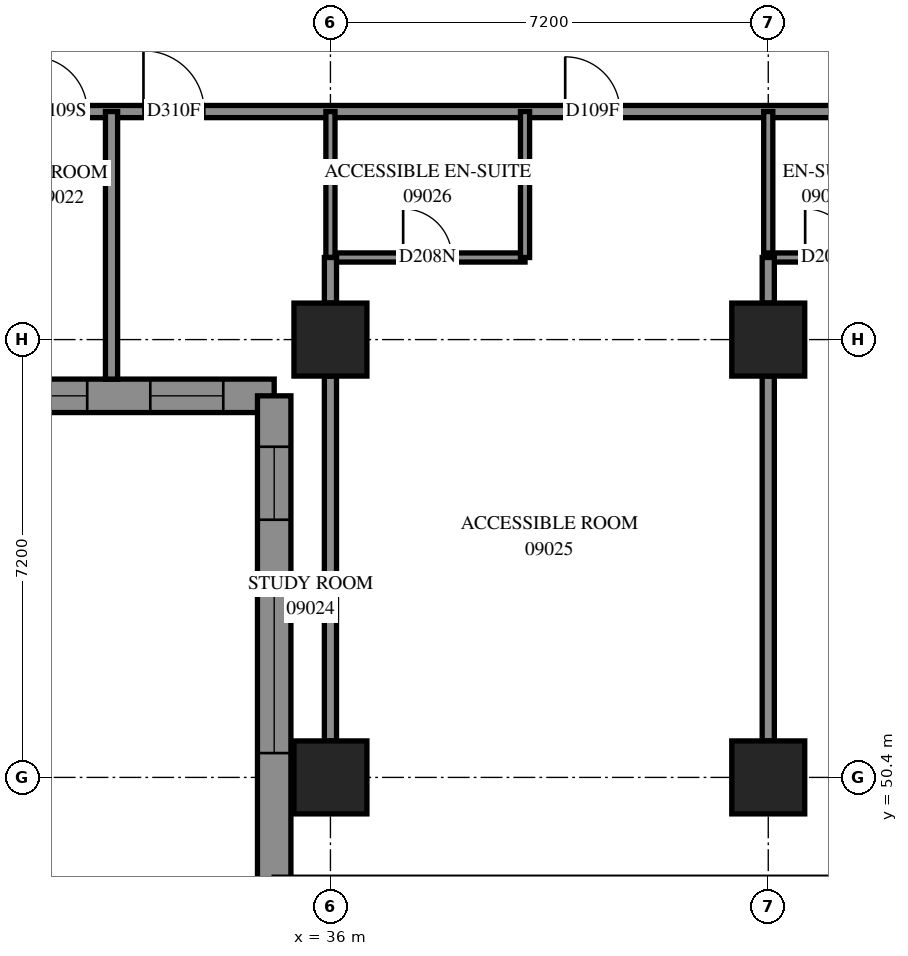
"""IFC4 building model, lengths in metres.
Left out: names, types, materials, properties, quantities, classifications, styles, units other than length and angle.
Written with IfcOpenShell. Run it as: python <this file> out.ifc"""

import sys

from ifc_helpers import new_model, si_unit, direction, frame, frame_2d, origin, origin_2d, place, context, subcontext, project, spatial, polyline, rectangle, outline, extrude, element, fill, save


model = new_model("IFC4")
c1 = context("Model", 3, precision=1e-05, world=origin(), true_north=direction((0.0, 1.0)))
c2 = subcontext(c1, "Body", "Model", "MODEL_VIEW")
j1 = project(units=[si_unit("LENGTHUNIT", "METRE"), si_unit("PLANEANGLEUNIT", "RADIAN")], contexts=[c1])
p1 = place(None, origin())
s1 = spatial("IfcSite", under=j1, at=p1, CompositionType="ELEMENT")
p2 = place(p1, origin())
s2 = spatial("IfcBuilding", under=s1, at=p2, CompositionType="ELEMENT")
p3 = place(p2, frame((0.0, 0.0, 37.2)))
s3 = spatial("IfcBuildingStorey", under=s2, at=p3, CompositionType="ELEMENT", Elevation=37.2)
for number, where, z_axis, x_axis in (
    (1, (36.0, 50.4, 0.0), (0.0, 0.0, 1.0), (1.0, 0.0, 0.0)),
    (2, (36.0, 57.6, 0.0), (0.0, 0.0, 1.0), (1.0, 0.0, 0.0)),
    (3, (43.2, 50.4, 0.0), (0.0, 0.0, 1.0), (1.0, 0.0, 0.0)),
    (4, (43.2, 57.6, 0.0), (0.0, 0.0, 1.0), (1.0, 0.0, 0.0)),
):
    element("IfcColumn", number, at=place(p3, frame(where, z_axis=z_axis, x_axis=x_axis)), inside=s3, PredefinedType="COLUMN", context=c2, shape_type="SweptSolid", body=[
        extrude(rectangle(XDim=1.2, YDim=1.2, at=origin_2d()), origin(), (0.0, 0.0, 1.0), 3.1),
    ])
p4 = place(p3, frame((27.875, 56.675, 0.0), z_axis=(0.0, 0.0, 1.0), x_axis=(1.0, 0.0, 0.0)))
e5 = element("IfcWall", 5, at=p4, inside=s3, PredefinedType="SOLIDWALL", context=c2, shape_type="SweptSolid", body=[
    extrude(outline(polyline([(-0.275, -0.275), (6.925, -0.275), (7.475, 0.275), (0.275, 0.275), (-0.275, -0.275)])), origin(), (0.0, 0.0, 1.0), 3.1),
])
p5 = place(p4, frame((1.325, 0.0, 0.5)))
e6 = element("IfcOpeningElement", 6, at=p5, cuts=e5, PredefinedType="OPENING", context=c2, shape_type="SweptSolid", body=[
    extrude(rectangle(XDim=2.8, YDim=2.45, at=frame_2d((1.4, 1.225))), frame((0.0, 0.285, 0.0), z_axis=(0.0, -1.0, 0.0), x_axis=(1.0, 0.0, 0.0)), (0.0, 0.0, 1.0), 0.57),
])
p6 = place(p4, frame((5.162, 0.0, 0.5)))
e7 = element("IfcOpeningElement", 7, at=p6, cuts=e5, PredefinedType="OPENING", context=c2, shape_type="SweptSolid", body=[
    extrude(rectangle(XDim=1.2, YDim=2.45, at=frame_2d((0.6, 1.225))), frame((0.0, 0.285, 0.0), z_axis=(0.0, -1.0, 0.0), x_axis=(1.0, 0.0, 0.0)), (0.0, 0.0, 1.0), 0.57),
])
p7 = place(p3, frame((35.075, 56.675, 0.0), z_axis=(0.0, 0.0, 1.0), x_axis=(0.0, -1.0, 0.0)))
e8 = element("IfcWall", 8, at=p7, inside=s3, PredefinedType="SOLIDWALL", context=c2, shape_type="SweptSolid", body=[
    extrude(outline(polyline([(0.275, -0.275), (8.466, -0.275), (7.916, 0.275), (-0.275, 0.275), (0.275, -0.275)])), origin(), (0.0, 0.0, 1.0), 3.1),
])
p8 = place(p7, frame((3.075, 0.0, 0.5)))
e9 = element("IfcOpeningElement", 9, at=p8, cuts=e8, PredefinedType="OPENING", context=c2, shape_type="SweptSolid", body=[
    extrude(rectangle(XDim=2.8, YDim=2.45, at=frame_2d((1.4, 1.225))), frame((0.0, 0.285, 0.0), z_axis=(0.0, -1.0, 0.0), x_axis=(1.0, 0.0, 0.0)), (0.0, 0.0, 1.0), 0.57),
])
p9 = place(p7, frame((0.838, 0.0, 0.5)))
e10 = element("IfcOpeningElement", 10, at=p9, cuts=e8, PredefinedType="OPENING", context=c2, shape_type="SweptSolid", body=[
    extrude(rectangle(XDim=1.2, YDim=2.45, at=frame_2d((0.6, 1.225))), frame((0.0, 0.285, 0.0), z_axis=(0.0, -1.0, 0.0), x_axis=(1.0, 0.0, 0.0)), (0.0, 0.0, 1.0), 0.57),
])
p10 = place(p3, frame((28.8, 61.35, 0.0), z_axis=(0.0, 0.0, 1.0), x_axis=(1.0, 0.0, 0.0)))
e11 = element("IfcWall", 11, at=p10, inside=s3, PredefinedType="PARTITIONING", context=c2, shape_type="SweptSolid", body=[
    extrude(rectangle(XDim=24.15, YDim=0.2, at=frame_2d((12.075, 0.0))), origin(), (0.0, 0.0, 1.0), 3.1),
])
p11 = place(p10, frame((2.3, 0.0, 0.0)))
e12 = element("IfcOpeningElement", 12, at=p11, cuts=e11, PredefinedType="OPENING", context=c2, shape_type="SweptSolid", body=[
    extrude(rectangle(XDim=0.9, YDim=2.1, at=frame_2d((0.45, 1.05))), frame((0.0, 0.11, 0.0), z_axis=(0.0, -1.0, 0.0), x_axis=(1.0, 0.0, 0.0)), (0.0, 0.0, 1.0), 0.22),
])
p12 = place(p10, frame((4.125, 0.0, 0.0)))
e13 = element("IfcOpeningElement", 13, at=p12, cuts=e11, PredefinedType="OPENING", context=c2, shape_type="SweptSolid", body=[
    extrude(rectangle(XDim=1.0, YDim=2.1, at=frame_2d((0.5, 1.05))), frame((0.0, 0.11, 0.0), z_axis=(0.0, -1.0, 0.0), x_axis=(1.0, 0.0, 0.0)), (0.0, 0.0, 1.0), 0.22),
])
p13 = place(p10, frame((11.061, 0.0, 0.0)))
e14 = element("IfcOpeningElement", 14, at=p13, cuts=e11, PredefinedType="OPENING", context=c2, shape_type="SweptSolid", body=[
    extrude(rectangle(XDim=0.9, YDim=2.1, at=frame_2d((0.45, 1.05))), frame((0.0, 0.11, 0.0), z_axis=(0.0, -1.0, 0.0), x_axis=(1.0, 0.0, 0.0)), (0.0, 0.0, 1.0), 0.22),
])
p14 = place(p10, frame((16.7, 0.0, 0.0)))
e15 = element("IfcOpeningElement", 15, at=p14, cuts=e11, PredefinedType="OPENING", context=c2, shape_type="SweptSolid", body=[
    extrude(rectangle(XDim=0.9, YDim=2.1, at=frame_2d((0.45, 1.05))), frame((0.0, 0.11, 0.0), z_axis=(0.0, -1.0, 0.0), x_axis=(1.0, 0.0, 0.0)), (0.0, 0.0, 1.0), 0.22),
])
p15 = place(p10, frame((18.508, 0.0, 0.0)))
e16 = element("IfcOpeningElement", 16, at=p15, cuts=e11, PredefinedType="OPENING", context=c2, shape_type="SweptSolid", body=[
    extrude(rectangle(XDim=1.0, YDim=2.1, at=frame_2d((0.5, 1.05))), frame((0.0, 0.11, 0.0), z_axis=(0.0, -1.0, 0.0), x_axis=(1.0, 0.0, 0.0)), (0.0, 0.0, 1.0), 0.22),
])
p16 = place(p10, frame((22.882, 0.0, 0.0)))
e17 = element("IfcOpeningElement", 17, at=p16, cuts=e11, PredefinedType="OPENING", context=c2, shape_type="SweptSolid", body=[
    extrude(rectangle(XDim=1.0, YDim=2.1, at=frame_2d((0.5, 1.05))), frame((0.0, 0.11, 0.0), z_axis=(0.0, -1.0, 0.0), x_axis=(1.0, 0.0, 0.0)), (0.0, 0.0, 1.0), 0.22),
])
p17 = place(p3, frame((36.0, 51.0, 0.0), z_axis=(0.0, 0.0, 1.0), x_axis=(0.0, 1.0, 0.0)))
e18 = element("IfcWall", 18, at=p17, inside=s3, PredefinedType="PARTITIONING", context=c2, shape_type="SweptSolid", body=[
    extrude(rectangle(XDim=6.0, YDim=0.2, at=frame_2d((3.0, 0.0))), origin(), (0.0, 0.0, 1.0), 2.6),
])
p18 = place(p3, frame((43.2, 51.0, 0.0), z_axis=(0.0, 0.0, 1.0), x_axis=(0.0, 1.0, 0.0)))
e19 = element("IfcWall", 19, at=p18, inside=s3, PredefinedType="PARTITIONING", context=c2, shape_type="SweptSolid", body=[
    extrude(rectangle(XDim=6.0, YDim=0.2, at=frame_2d((3.0, 0.0))), origin(), (0.0, 0.0, 1.0), 3.1),
])
p19 = place(p3, frame((32.4, 56.95, 0.0), z_axis=(0.0, 0.0, 1.0), x_axis=(0.0, 1.0, 0.0)))
e20 = element("IfcWall", 20, at=p19, inside=s3, PredefinedType="PARTITIONING", context=c2, shape_type="SweptSolid", body=[
    extrude(rectangle(XDim=4.4, YDim=0.2, at=frame_2d((2.2, 0.0))), origin(), (0.0, 0.0, 1.0), 3.1),
])
p20 = place(p3, frame((36.0, 58.95, 0.0), z_axis=(0.0, 0.0, 1.0), x_axis=(1.0, 0.0, 0.0)))
e21 = element("IfcWall", 21, at=p20, inside=s3, PredefinedType="PARTITIONING", context=c2, shape_type="SweptSolid", body=[
    extrude(rectangle(XDim=3.2, YDim=0.15, at=frame_2d((1.6, 0.0))), origin(), (0.0, 0.0, 1.0), 3.1),
])
p21 = place(p20, frame((1.196, 0.0, 0.0)))
e22 = element("IfcOpeningElement", 22, at=p21, cuts=e21, PredefinedType="OPENING", context=c2, shape_type="SweptSolid", body=[
    extrude(rectangle(XDim=0.8, YDim=2.1, at=frame_2d((0.4, 1.05))), frame((0.0, 0.085, 0.0), z_axis=(0.0, -1.0, 0.0), x_axis=(1.0, 0.0, 0.0)), (0.0, 0.0, 1.0), 0.17),
])
for number, where, z_axis, x_axis in (
    (23, (39.2, 58.95, 0.0), (0.0, 0.0, 1.0), (0.0, 1.0, 0.0)),
    (24, (36.0, 58.95, 0.0), (0.0, 0.0, 1.0), (0.0, 1.0, 0.0)),
    (25, (43.2, 58.95, 0.0), (0.0, 0.0, 1.0), (0.0, 1.0, 0.0)),
):
    element("IfcWall", number, at=place(p3, frame(where, z_axis=z_axis, x_axis=x_axis)), inside=s3, PredefinedType="PARTITIONING", context=c2, shape_type="SweptSolid", body=[
        extrude(rectangle(XDim=2.4, YDim=0.15, at=frame_2d((1.2, 0.0))), origin(), (0.0, 0.0, 1.0), 3.1),
    ])
p22 = place(p3, frame((43.2, 58.95, 0.0), z_axis=(0.0, 0.0, 1.0), x_axis=(1.0, 0.0, 0.0)))
e26 = element("IfcWall", 26, at=p22, inside=s3, PredefinedType="PARTITIONING", context=c2, shape_type="SweptSolid", body=[
    extrude(rectangle(XDim=1.9, YDim=0.15, at=frame_2d((0.95, 0.0))), origin(), (0.0, 0.0, 1.0), 3.1),
])
p23 = place(p22, frame((0.607, 0.0, 0.0)))
e27 = element("IfcOpeningElement", 27, at=p23, cuts=e26, PredefinedType="OPENING", context=c2, shape_type="SweptSolid", body=[
    extrude(rectangle(XDim=0.8, YDim=2.1, at=frame_2d((0.4, 1.05))), frame((0.0, 0.085, 0.0), z_axis=(0.0, -1.0, 0.0), x_axis=(1.0, 0.0, 0.0)), (0.0, 0.0, 1.0), 0.17),
])
for number, where, z_axis, x_axis in (
    (28, (36.0, 58.2, 0.0), (0.0, 0.0, 1.0), (0.0, 1.0, 0.0)),
    (29, (43.2, 58.2, 0.0), (0.0, 0.0, 1.0), (0.0, 1.0, 0.0)),
):
    element("IfcWall", number, at=place(p3, frame(where, z_axis=z_axis, x_axis=x_axis)), inside=s3, PredefinedType="PARTITIONING", context=c2, shape_type="SweptSolid", body=[
        extrude(rectangle(XDim=0.75, YDim=0.2, at=frame_2d((0.375, 0.0))), origin(), (0.0, 0.0, 1.0), 3.1),
    ])
p24 = place(p5, origin())
e30 = element("IfcWindow", 30, at=p24, inside=s3, PartitioningType="SINGLE_PANEL", PredefinedType="WINDOW", context=c2, shape_type="SweptSolid", body=[
    extrude(rectangle(XDim=2.8, YDim=2.45, at=frame_2d((1.4, 1.225))), frame((0.0, 0.155, 0.0), z_axis=(0.0, -1.0, 0.0), x_axis=(1.0, 0.0, 0.0)), (0.0, 0.0, 1.0), 0.06),
])
fill(e6, e30)
p25 = place(p6, origin())
e31 = element("IfcWindow", 31, at=p25, inside=s3, PartitioningType="SINGLE_PANEL", PredefinedType="WINDOW", context=c2, shape_type="SweptSolid", body=[
    extrude(rectangle(XDim=1.2, YDim=2.45, at=frame_2d((0.6, 1.225))), frame((0.0, 0.155, 0.0), z_axis=(0.0, -1.0, 0.0), x_axis=(1.0, 0.0, 0.0)), (0.0, 0.0, 1.0), 0.06),
])
fill(e7, e31)
p26 = place(p8, origin())
e32 = element("IfcWindow", 32, at=p26, inside=s3, PartitioningType="SINGLE_PANEL", PredefinedType="WINDOW", context=c2, shape_type="SweptSolid", body=[
    extrude(rectangle(XDim=2.8, YDim=2.45, at=frame_2d((1.4, 1.225))), frame((0.0, 0.155, 0.0), z_axis=(0.0, -1.0, 0.0), x_axis=(1.0, 0.0, 0.0)), (0.0, 0.0, 1.0), 0.06),
])
fill(e9, e32)
p27 = place(p9, origin())
e33 = element("IfcWindow", 33, at=p27, inside=s3, PartitioningType="SINGLE_PANEL", PredefinedType="WINDOW", context=c2, shape_type="SweptSolid", body=[
    extrude(rectangle(XDim=1.2, YDim=2.45, at=frame_2d((0.6, 1.225))), frame((0.0, 0.155, 0.0), z_axis=(0.0, -1.0, 0.0), x_axis=(1.0, 0.0, 0.0)), (0.0, 0.0, 1.0), 0.06),
])
fill(e10, e33)
p28 = place(p11, origin())
e34 = element("IfcDoor", 34, at=p28, inside=s3, OperationType="SINGLE_SWING_LEFT", PredefinedType="DOOR", context=c2, shape_type="SweptSolid", body=[
    extrude(rectangle(XDim=0.9, YDim=2.1, at=frame_2d((0.45, 1.05))), frame((0.0, 0.025, 0.0), z_axis=(0.0, -1.0, 0.0), x_axis=(1.0, 0.0, 0.0)), (0.0, 0.0, 1.0), 0.05),
])
fill(e12, e34)
p29 = place(p12, origin())
e35 = element("IfcDoor", 35, at=p29, inside=s3, OperationType="SINGLE_SWING_RIGHT", PredefinedType="DOOR", context=c2, shape_type="SweptSolid", body=[
    extrude(rectangle(XDim=1.0, YDim=2.1, at=frame_2d((0.5, 1.05))), frame((0.0, 0.025, 0.0), z_axis=(0.0, -1.0, 0.0), x_axis=(1.0, 0.0, 0.0)), (0.0, 0.0, 1.0), 0.05),
])
fill(e13, e35)
p30 = place(p13, origin())
e36 = element("IfcDoor", 36, at=p30, inside=s3, OperationType="SINGLE_SWING_LEFT", PredefinedType="DOOR", context=c2, shape_type="SweptSolid", body=[
    extrude(rectangle(XDim=0.9, YDim=2.1, at=frame_2d((0.45, 1.05))), frame((0.0, 0.025, 0.0), z_axis=(0.0, -1.0, 0.0), x_axis=(1.0, 0.0, 0.0)), (0.0, 0.0, 1.0), 0.05),
])
fill(e14, e36)
p31 = place(p21, origin())
e37 = element("IfcDoor", 37, at=p31, inside=s3, OperationType="SINGLE_SWING_RIGHT", PredefinedType="DOOR", context=c2, shape_type="SweptSolid", body=[
    extrude(rectangle(XDim=0.8, YDim=2.1, at=frame_2d((0.4, 1.05))), frame((0.0, 0.025, 0.0), z_axis=(0.0, -1.0, 0.0), x_axis=(1.0, 0.0, 0.0)), (0.0, 0.0, 1.0), 0.05),
])
fill(e22, e37)
p32 = place(p23, origin())
e38 = element("IfcDoor", 38, at=p32, inside=s3, OperationType="SINGLE_SWING_RIGHT", PredefinedType="DOOR", context=c2, shape_type="SweptSolid", body=[
    extrude(rectangle(XDim=0.8, YDim=2.1, at=frame_2d((0.4, 1.05))), frame((0.0, 0.025, 0.0), z_axis=(0.0, -1.0, 0.0), x_axis=(1.0, 0.0, 0.0)), (0.0, 0.0, 1.0), 0.05),
])
fill(e27, e38)
save(model, sys.argv[1])
